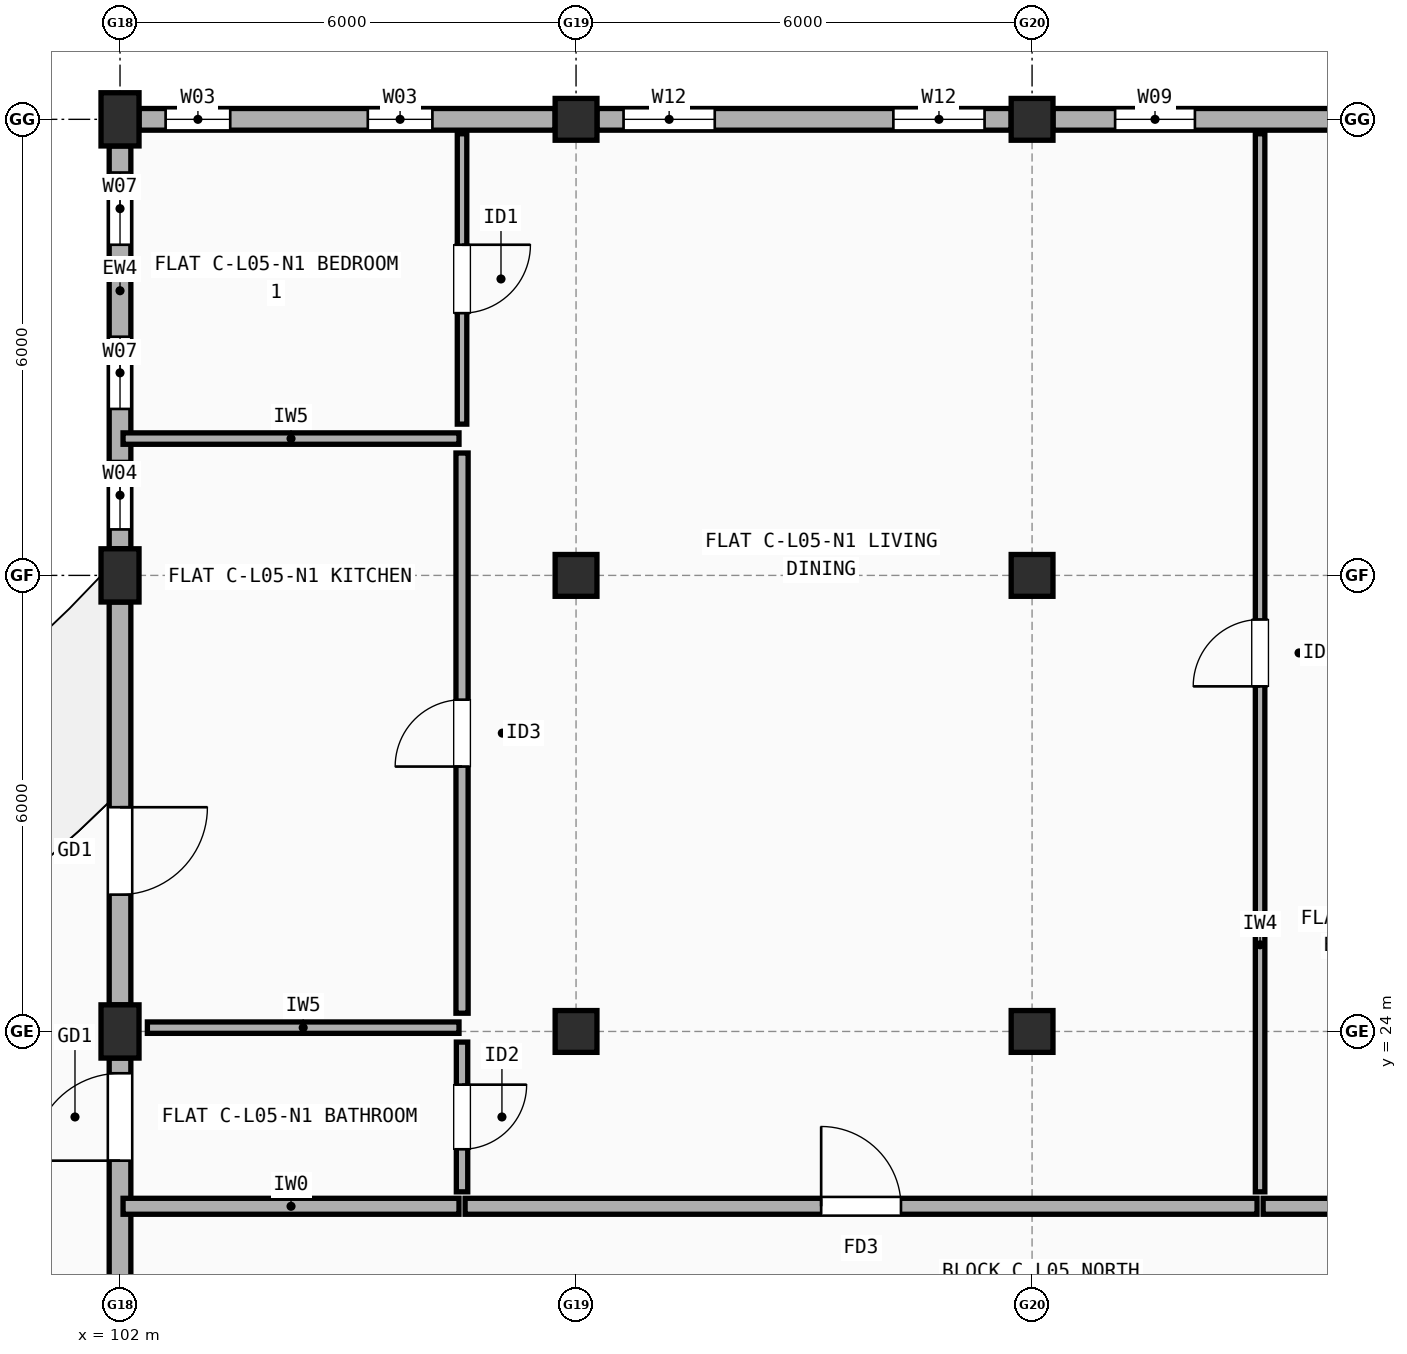
"""IFC4 building model, lengths in metres.
Left out: names, types, materials, properties, quantities, classifications, styles, units other than length and angle.
Written with IfcOpenShell. Run it as: python <this file> out.ifc"""

import sys

from ifc_helpers import new_model, si_unit, direction, frame, frame_2d, origin, origin_2d, place, context, subcontext, project, spatial, rectangle, extrude, element, fill, save


model = new_model("IFC4")
c1 = context("Model", 3, precision=1e-05, world=origin(), true_north=direction((0.0, 1.0)))
c2 = subcontext(c1, "Body", "Model", "MODEL_VIEW")
j1 = project(units=[si_unit("LENGTHUNIT", "METRE"), si_unit("PLANEANGLEUNIT", "RADIAN")], contexts=[c1])
p1 = place(None, origin())
s1 = spatial("IfcSite", under=j1, at=p1, CompositionType="ELEMENT")
p2 = place(p1, origin())
s2 = spatial("IfcBuilding", under=s1, at=p2, CompositionType="ELEMENT")
p3 = place(p2, frame((0.0, 0.0, 17.3)))
s3 = spatial("IfcBuildingStorey", under=s2, at=p3, CompositionType="ELEMENT", Elevation=17.3)
for number, where, z_axis, x_axis in (
    (1, (102.0, 24.0, 0.0), (0.0, 0.0, 1.0), (1.0, 0.0, 0.0)),
    (2, (102.0, 30.0, 0.0), (0.0, 0.0, 1.0), (1.0, 0.0, 0.0)),
    (3, (102.0, 36.0, 0.0), (0.0, 0.0, 1.0), (1.0, 0.0, 0.0)),
):
    element("IfcColumn", number, at=place(p3, frame(where, z_axis=z_axis, x_axis=x_axis)), inside=s3, PredefinedType="COLUMN", context=c2, shape_type="SweptSolid", body=[
        extrude(rectangle(XDim=0.5, YDim=0.7, at=origin_2d()), origin(), (0.0, 0.0, 1.0), 2.965),
    ])
for number, where, z_axis, x_axis in (
    (4, (108.0, 24.0, 0.0), (0.0, 0.0, 1.0), (1.0, 0.0, 0.0)),
    (5, (108.0, 30.0, 0.0), (0.0, 0.0, 1.0), (1.0, 0.0, 0.0)),
    (6, (108.0, 36.0, 0.0), (0.0, 0.0, 1.0), (1.0, 0.0, 0.0)),
    (7, (114.0, 24.0, 0.0), (0.0, 0.0, 1.0), (1.0, 0.0, 0.0)),
    (8, (114.0, 30.0, 0.0), (0.0, 0.0, 1.0), (1.0, 0.0, 0.0)),
    (9, (114.0, 36.0, 0.0), (0.0, 0.0, 1.0), (1.0, 0.0, 0.0)),
):
    element("IfcColumn", number, at=place(p3, frame(where, z_axis=z_axis, x_axis=x_axis)), inside=s3, PredefinedType="COLUMN", context=c2, shape_type="SweptSolid", body=[
        extrude(rectangle(XDim=0.55, YDim=0.55, at=origin_2d()), origin(), (0.0, 0.0, 1.0), 2.965),
    ])
p4 = place(p3, frame((119.725, 36.0, 0.0), z_axis=(0.0, 0.0, 1.0), x_axis=(-1.0, 0.0, 0.0)))
e10 = element("IfcWall", 10, at=p4, inside=s3, PredefinedType="STANDARD", context=c2, shape_type="SweptSolid", body=[
    extrude(rectangle(XDim=5.45, YDim=0.285, at=frame_2d((2.725, 0.0))), origin(), (0.0, 0.0, 1.0), 2.447),
])
p5 = place(p4, frame((0.867, 0.0, 0.9)))
e11 = element("IfcOpeningElement", 11, at=p5, cuts=e10, PredefinedType="OPENING", context=c2, shape_type="SweptSolid", body=[
    extrude(rectangle(XDim=0.95, YDim=1.35, at=frame_2d((0.475, 0.675))), frame((0.0, 0.152, 0.0), z_axis=(0.0, -1.0, 0.0), x_axis=(1.0, 0.0, 0.0)), (0.0, 0.0, 1.0), 0.305),
])
p6 = place(p4, frame((3.583, 0.0, 0.9)))
e12 = element("IfcOpeningElement", 12, at=p6, cuts=e10, PredefinedType="OPENING", context=c2, shape_type="SweptSolid", body=[
    extrude(rectangle(XDim=1.05, YDim=1.35, at=frame_2d((0.525, 0.675))), frame((0.0, 0.152, 0.0), z_axis=(0.0, -1.0, 0.0), x_axis=(1.0, 0.0, 0.0)), (0.0, 0.0, 1.0), 0.305),
])
p7 = place(p3, frame((113.725, 36.0, 0.0), z_axis=(0.0, 0.0, 1.0), x_axis=(-1.0, 0.0, 0.0)))
e13 = element("IfcWall", 13, at=p7, inside=s3, PredefinedType="STANDARD", context=c2, shape_type="SweptSolid", body=[
    extrude(rectangle(XDim=5.45, YDim=0.285, at=frame_2d((2.725, 0.0))), origin(), (0.0, 0.0, 1.0), 2.447),
])
p8 = place(p7, frame((0.35, 0.0, 0.9)))
e14 = element("IfcOpeningElement", 14, at=p8, cuts=e13, PredefinedType="OPENING", context=c2, shape_type="SweptSolid", body=[
    extrude(rectangle(XDim=1.2, YDim=1.35, at=frame_2d((0.6, 0.675))), frame((0.0, 0.152, 0.0), z_axis=(0.0, -1.0, 0.0), x_axis=(1.0, 0.0, 0.0)), (0.0, 0.0, 1.0), 0.305),
])
p9 = place(p7, frame((3.9, 0.0, 0.9)))
e15 = element("IfcOpeningElement", 15, at=p9, cuts=e13, PredefinedType="OPENING", context=c2, shape_type="SweptSolid", body=[
    extrude(rectangle(XDim=1.2, YDim=1.35, at=frame_2d((0.6, 0.675))), frame((0.0, 0.152, 0.0), z_axis=(0.0, -1.0, 0.0), x_axis=(1.0, 0.0, 0.0)), (0.0, 0.0, 1.0), 0.305),
])
p10 = place(p3, frame((107.725, 36.0, 0.0), z_axis=(0.0, 0.0, 1.0), x_axis=(-1.0, 0.0, 0.0)))
e16 = element("IfcWall", 16, at=p10, inside=s3, PredefinedType="STANDARD", context=c2, shape_type="SweptSolid", body=[
    extrude(rectangle(XDim=5.475, YDim=0.285, at=frame_2d((2.738, 0.0))), origin(), (0.0, 0.0, 1.0), 2.447),
])
p11 = place(p10, frame((1.615, 0.0, 0.9)))
e17 = element("IfcOpeningElement", 17, at=p11, cuts=e16, PredefinedType="OPENING", context=c2, shape_type="SweptSolid", body=[
    extrude(rectangle(XDim=0.85, YDim=1.25, at=frame_2d((0.425, 0.625))), frame((0.0, 0.152, 0.0), z_axis=(0.0, -1.0, 0.0), x_axis=(1.0, 0.0, 0.0)), (0.0, 0.0, 1.0), 0.305),
])
p12 = place(p10, frame((4.275, 0.0, 0.9)))
e18 = element("IfcOpeningElement", 18, at=p12, cuts=e16, PredefinedType="OPENING", context=c2, shape_type="SweptSolid", body=[
    extrude(rectangle(XDim=0.85, YDim=1.25, at=frame_2d((0.425, 0.625))), frame((0.0, 0.152, 0.0), z_axis=(0.0, -1.0, 0.0), x_axis=(1.0, 0.0, 0.0)), (0.0, 0.0, 1.0), 0.305),
])
p13 = place(p3, frame((102.0, 35.65, 0.0), z_axis=(0.0, 0.0, 1.0), x_axis=(0.0, -1.0, 0.0)))
e19 = element("IfcWall", 19, at=p13, inside=s3, PredefinedType="STANDARD", context=c2, shape_type="SweptSolid", body=[
    extrude(rectangle(XDim=5.3, YDim=0.285, at=frame_2d((2.65, 0.0))), origin(), (0.0, 0.0, 1.0), 2.447),
])
p14 = place(p13, frame((0.35, 0.0, 0.9)))
e20 = element("IfcOpeningElement", 20, at=p14, cuts=e19, PredefinedType="OPENING", context=c2, shape_type="SweptSolid", body=[
    extrude(rectangle(XDim=0.95, YDim=1.35, at=frame_2d((0.475, 0.675))), frame((0.0, 0.152, 0.0), z_axis=(0.0, -1.0, 0.0), x_axis=(1.0, 0.0, 0.0)), (0.0, 0.0, 1.0), 0.305),
])
p15 = place(p13, frame((2.51, 0.0, 0.9)))
e21 = element("IfcOpeningElement", 21, at=p15, cuts=e19, PredefinedType="OPENING", context=c2, shape_type="SweptSolid", body=[
    extrude(rectangle(XDim=0.95, YDim=1.35, at=frame_2d((0.475, 0.675))), frame((0.0, 0.152, 0.0), z_axis=(0.0, -1.0, 0.0), x_axis=(1.0, 0.0, 0.0)), (0.0, 0.0, 1.0), 0.305),
])
p16 = place(p13, frame((4.145, 0.0, 0.9)))
e22 = element("IfcOpeningElement", 22, at=p16, cuts=e19, PredefinedType="OPENING", context=c2, shape_type="SweptSolid", body=[
    extrude(rectangle(XDim=0.9, YDim=1.3, at=frame_2d((0.45, 0.65))), frame((0.0, 0.152, 0.0), z_axis=(0.0, -1.0, 0.0), x_axis=(1.0, 0.0, 0.0)), (0.0, 0.0, 1.0), 0.305),
])
p17 = place(p3, frame((102.0, 29.65, 0.0), z_axis=(0.0, 0.0, 1.0), x_axis=(0.0, -1.0, 0.0)))
e23 = element("IfcWall", 23, at=p17, inside=s3, PredefinedType="STANDARD", context=c2, shape_type="SweptSolid", body=[
    extrude(rectangle(XDim=5.3, YDim=0.285, at=frame_2d((2.65, 0.0))), origin(), (0.0, 0.0, 1.0), 2.447),
])
p18 = place(p17, frame((2.7, 0.0, 0.0)))
e24 = element("IfcOpeningElement", 24, at=p18, cuts=e23, PredefinedType="OPENING", context=c2, shape_type="SweptSolid", body=[
    extrude(rectangle(XDim=1.15, YDim=2.15, at=frame_2d((0.575, 1.075))), frame((0.0, 0.152, 0.0), z_axis=(0.0, -1.0, 0.0), x_axis=(1.0, 0.0, 0.0)), (0.0, 0.0, 1.0), 0.305),
])
p19 = place(p3, frame((102.0, 23.65, 0.0), z_axis=(0.0, 0.0, 1.0), x_axis=(0.0, -1.0, 0.0)))
e25 = element("IfcWall", 25, at=p19, inside=s3, PredefinedType="STANDARD", context=c2, shape_type="SweptSolid", body=[
    extrude(rectangle(XDim=5.3, YDim=0.285, at=frame_2d((2.65, 0.0))), origin(), (0.0, 0.0, 1.0), 2.447),
])
p20 = place(p19, frame((0.2, 0.0, 0.0)))
e26 = element("IfcOpeningElement", 26, at=p20, cuts=e25, PredefinedType="OPENING", context=c2, shape_type="SweptSolid", body=[
    extrude(rectangle(XDim=1.15, YDim=2.15, at=frame_2d((0.575, 1.075))), frame((0.0, 0.152, 0.0), z_axis=(0.0, -1.0, 0.0), x_axis=(1.0, 0.0, 0.0)), (0.0, 0.0, 1.0), 0.305),
])
p21 = place(p19, frame((3.245, 0.0, 0.9)))
e27 = element("IfcOpeningElement", 27, at=p21, cuts=e25, PredefinedType="OPENING", context=c2, shape_type="SweptSolid", body=[
    extrude(rectangle(XDim=0.8, YDim=1.2, at=frame_2d((0.4, 0.6))), frame((0.0, 0.152, 0.0), z_axis=(0.0, -1.0, 0.0), x_axis=(1.0, 0.0, 0.0)), (0.0, 0.0, 1.0), 0.305),
])
p22 = place(p3, frame((102.04, 21.7, 0.0), z_axis=(0.0, 0.0, 1.0), x_axis=(1.0, 0.0, 0.0)))
e28 = element("IfcWall", 28, at=p22, inside=s3, PredefinedType="SOLIDWALL", context=c2, shape_type="SweptSolid", body=[
    extrude(rectangle(XDim=4.42, YDim=0.21, at=frame_2d((2.21, 0.0))), origin(), (0.0, 0.0, 1.0), 2.447),
])
p23 = place(p3, frame((106.54, 21.7, 0.0), z_axis=(0.0, 0.0, 1.0), x_axis=(1.0, 0.0, 0.0)))
e29 = element("IfcWall", 29, at=p23, inside=s3, PredefinedType="SOLIDWALL", context=c2, shape_type="SweptSolid", body=[
    extrude(rectangle(XDim=10.42, YDim=0.21, at=frame_2d((5.21, 0.0))), origin(), (0.0, 0.0, 1.0), 2.508),
])
p24 = place(p23, frame((4.685, 0.0, 0.0)))
e30 = element("IfcOpeningElement", 30, at=p24, cuts=e29, PredefinedType="OPENING", context=c2, shape_type="SweptSolid", body=[
    extrude(rectangle(XDim=1.05, YDim=2.15, at=frame_2d((0.525, 1.075))), frame((0.0, 0.115, 0.0), z_axis=(0.0, -1.0, 0.0), x_axis=(1.0, 0.0, 0.0)), (0.0, 0.0, 1.0), 0.23),
])
p25 = place(p3, frame((106.5, 31.99, 0.0), z_axis=(0.0, 0.0, 1.0), x_axis=(0.0, 1.0, 0.0)))
e31 = element("IfcWall", 31, at=p25, inside=s3, PredefinedType="PARTITIONING", context=c2, shape_type="SweptSolid", body=[
    extrude(rectangle(XDim=3.82, YDim=0.125, at=frame_2d((1.91, 0.0))), origin(), (0.0, 0.0, 1.0), 2.965),
])
p26 = place(p25, frame((1.46, 0.0, 0.0)))
e32 = element("IfcOpeningElement", 32, at=p26, cuts=e31, PredefinedType="OPENING", context=c2, shape_type="SweptSolid", body=[
    extrude(rectangle(XDim=0.9, YDim=2.1, at=frame_2d((0.45, 1.05))), frame((0.0, 0.073, 0.0), z_axis=(0.0, -1.0, 0.0), x_axis=(1.0, 0.0, 0.0)), (0.0, 0.0, 1.0), 0.145),
])
p27 = place(p3, frame((106.5, 24.24, 0.0), z_axis=(0.0, 0.0, 1.0), x_axis=(0.0, 1.0, 0.0)))
e33 = element("IfcWall", 33, at=p27, inside=s3, PredefinedType="PLUMBINGWALL", context=c2, shape_type="SweptSolid", body=[
    extrude(rectangle(XDim=7.37, YDim=0.16, at=frame_2d((3.685, 0.0))), origin(), (0.0, 0.0, 1.0), 2.447),
])
p28 = place(p27, frame((3.245, 0.0, 0.0)))
e34 = element("IfcOpeningElement", 34, at=p28, cuts=e33, PredefinedType="OPENING", context=c2, shape_type="SweptSolid", body=[
    extrude(rectangle(XDim=0.88, YDim=2.1, at=frame_2d((0.44, 1.05))), frame((0.0, 0.09, 0.0), z_axis=(0.0, -1.0, 0.0), x_axis=(1.0, 0.0, 0.0)), (0.0, 0.0, 1.0), 0.18),
])
p29 = place(p3, frame((106.5, 21.89, 0.0), z_axis=(0.0, 0.0, 1.0), x_axis=(0.0, 1.0, 0.0)))
e35 = element("IfcWall", 35, at=p29, inside=s3, PredefinedType="PARTITIONING", context=c2, shape_type="SweptSolid", body=[
    extrude(rectangle(XDim=1.97, YDim=0.15, at=frame_2d((0.985, 0.0))), origin(), (0.0, 0.0, 1.0), 2.965),
])
p30 = place(p29, frame((0.56, 0.0, 0.0)))
e36 = element("IfcOpeningElement", 36, at=p30, cuts=e35, PredefinedType="OPENING", context=c2, shape_type="SweptSolid", body=[
    extrude(rectangle(XDim=0.85, YDim=2.1, at=frame_2d((0.425, 1.05))), frame((0.0, 0.085, 0.0), z_axis=(0.0, -1.0, 0.0), x_axis=(1.0, 0.0, 0.0)), (0.0, 0.0, 1.0), 0.17),
])
p31 = place(p3, frame((102.04, 31.8, 0.0), z_axis=(0.0, 0.0, 1.0), x_axis=(1.0, 0.0, 0.0)))
e37 = element("IfcWall", 37, at=p31, inside=s3, PredefinedType="PARTITIONING", context=c2, shape_type="SweptSolid", body=[
    extrude(rectangle(XDim=4.42, YDim=0.15, at=frame_2d((2.21, 0.0))), origin(), (0.0, 0.0, 1.0), 2.447),
])
p32 = place(p3, frame((102.36, 24.05, 0.0), z_axis=(0.0, 0.0, 1.0), x_axis=(1.0, 0.0, 0.0)))
e38 = element("IfcWall", 38, at=p32, inside=s3, PredefinedType="PARTITIONING", context=c2, shape_type="SweptSolid", body=[
    extrude(rectangle(XDim=4.1, YDim=0.15, at=frame_2d((2.05, 0.0))), origin(), (0.0, 0.0, 1.0), 2.508),
])
p33 = place(p3, frame((117.04, 21.7, 0.0), z_axis=(0.0, 0.0, 1.0), x_axis=(1.0, 0.0, 0.0)))
e39 = element("IfcWall", 39, at=p33, inside=s3, PredefinedType="SOLIDWALL", context=c2, shape_type="SweptSolid", body=[
    extrude(rectangle(XDim=2.92, YDim=0.21, at=frame_2d((1.46, 0.0))), origin(), (0.0, 0.0, 1.0), 2.965),
])
p34 = place(p3, frame((117.0, 21.89, 0.0), z_axis=(0.0, 0.0, 1.0), x_axis=(0.0, 1.0, 0.0)))
e40 = element("IfcWall", 40, at=p34, inside=s3, PredefinedType="PARTITIONING", context=c2, shape_type="SweptSolid", body=[
    extrude(rectangle(XDim=13.92, YDim=0.125, at=frame_2d((6.96, 0.0))), origin(), (0.0, 0.0, 1.0), 2.447),
])
p35 = place(p34, frame((6.65, 0.0, 0.0)))
e41 = element("IfcOpeningElement", 41, at=p35, cuts=e40, PredefinedType="OPENING", context=c2, shape_type="SweptSolid", body=[
    extrude(rectangle(XDim=0.88, YDim=2.1, at=frame_2d((0.44, 1.05))), frame((0.0, 0.073, 0.0), z_axis=(0.0, -1.0, 0.0), x_axis=(1.0, 0.0, 0.0)), (0.0, 0.0, 1.0), 0.145),
])
p36 = place(p6, origin())
e42 = element("IfcWindow", 42, at=p36, inside=s3, PartitioningType="SINGLE_PANEL", PredefinedType="WINDOW", context=c2, shape_type="SweptSolid", body=[
    extrude(rectangle(XDim=1.05, YDim=1.35, at=frame_2d((0.525, 0.675))), frame((0.0, 0.03, 0.0), z_axis=(0.0, -1.0, 0.0), x_axis=(1.0, 0.0, 0.0)), (0.0, 0.0, 1.0), 0.06),
])
fill(e12, e42)
p37 = place(p8, origin())
e43 = element("IfcWindow", 43, at=p37, inside=s3, PartitioningType="SINGLE_PANEL", PredefinedType="WINDOW", context=c2, shape_type="SweptSolid", body=[
    extrude(rectangle(XDim=1.2, YDim=1.35, at=frame_2d((0.6, 0.675))), frame((0.0, 0.03, 0.0), z_axis=(0.0, -1.0, 0.0), x_axis=(1.0, 0.0, 0.0)), (0.0, 0.0, 1.0), 0.06),
])
fill(e14, e43)
p38 = place(p9, origin())
e44 = element("IfcWindow", 44, at=p38, inside=s3, PartitioningType="SINGLE_PANEL", PredefinedType="WINDOW", context=c2, shape_type="SweptSolid", body=[
    extrude(rectangle(XDim=1.2, YDim=1.35, at=frame_2d((0.6, 0.675))), frame((0.0, 0.03, 0.0), z_axis=(0.0, -1.0, 0.0), x_axis=(1.0, 0.0, 0.0)), (0.0, 0.0, 1.0), 0.06),
])
fill(e15, e44)
p39 = place(p11, origin())
e45 = element("IfcWindow", 45, at=p39, inside=s3, PartitioningType="SINGLE_PANEL", PredefinedType="WINDOW", context=c2, shape_type="SweptSolid", body=[
    extrude(rectangle(XDim=0.85, YDim=1.25, at=frame_2d((0.425, 0.625))), frame((0.0, 0.03, 0.0), z_axis=(0.0, -1.0, 0.0), x_axis=(1.0, 0.0, 0.0)), (0.0, 0.0, 1.0), 0.06),
])
fill(e17, e45)
p40 = place(p12, origin())
e46 = element("IfcWindow", 46, at=p40, inside=s3, PartitioningType="SINGLE_PANEL", PredefinedType="WINDOW", context=c2, shape_type="SweptSolid", body=[
    extrude(rectangle(XDim=0.85, YDim=1.25, at=frame_2d((0.425, 0.625))), frame((0.0, 0.03, 0.0), z_axis=(0.0, -1.0, 0.0), x_axis=(1.0, 0.0, 0.0)), (0.0, 0.0, 1.0), 0.06),
])
fill(e18, e46)
p41 = place(p14, origin())
e47 = element("IfcWindow", 47, at=p41, inside=s3, PartitioningType="SINGLE_PANEL", PredefinedType="WINDOW", context=c2, shape_type="SweptSolid", body=[
    extrude(rectangle(XDim=0.95, YDim=1.35, at=frame_2d((0.475, 0.675))), frame((0.0, 0.03, 0.0), z_axis=(0.0, -1.0, 0.0), x_axis=(1.0, 0.0, 0.0)), (0.0, 0.0, 1.0), 0.06),
])
fill(e20, e47)
p42 = place(p15, origin())
e48 = element("IfcWindow", 48, at=p42, inside=s3, PartitioningType="SINGLE_PANEL", PredefinedType="WINDOW", context=c2, shape_type="SweptSolid", body=[
    extrude(rectangle(XDim=0.95, YDim=1.35, at=frame_2d((0.475, 0.675))), frame((0.0, 0.03, 0.0), z_axis=(0.0, -1.0, 0.0), x_axis=(1.0, 0.0, 0.0)), (0.0, 0.0, 1.0), 0.06),
])
fill(e21, e48)
p43 = place(p16, origin())
e49 = element("IfcWindow", 49, at=p43, inside=s3, PartitioningType="SINGLE_PANEL", PredefinedType="WINDOW", context=c2, shape_type="SweptSolid", body=[
    extrude(rectangle(XDim=0.9, YDim=1.3, at=frame_2d((0.45, 0.65))), frame((0.0, 0.03, 0.0), z_axis=(0.0, -1.0, 0.0), x_axis=(1.0, 0.0, 0.0)), (0.0, 0.0, 1.0), 0.06),
])
fill(e22, e49)
p44 = place(p18, frame((1.15, 0.0, 0.0), z_axis=(0.0, 0.0, 1.0), x_axis=(-1.0, 0.0, 0.0)))
e50 = element("IfcDoor", 50, at=p44, inside=s3, OperationType="SINGLE_SWING_LEFT", PredefinedType="DOOR", context=c2, shape_type="SweptSolid", body=[
    extrude(rectangle(XDim=1.15, YDim=2.15, at=frame_2d((0.575, 1.075))), frame((0.0, 0.025, 0.0), z_axis=(0.0, -1.0, 0.0), x_axis=(1.0, 0.0, 0.0)), (0.0, 0.0, 1.0), 0.05),
])
fill(e24, e50)
p45 = place(p20, frame((1.15, 0.0, 0.0), z_axis=(0.0, 0.0, 1.0), x_axis=(-1.0, 0.0, 0.0)))
e51 = element("IfcDoor", 51, at=p45, inside=s3, OperationType="SINGLE_SWING_RIGHT", PredefinedType="DOOR", context=c2, shape_type="SweptSolid", body=[
    extrude(rectangle(XDim=1.15, YDim=2.15, at=frame_2d((0.575, 1.075))), frame((0.0, 0.025, 0.0), z_axis=(0.0, -1.0, 0.0), x_axis=(1.0, 0.0, 0.0)), (0.0, 0.0, 1.0), 0.05),
])
fill(e26, e51)
p46 = place(p24, origin())
e52 = element("IfcDoor", 52, at=p46, inside=s3, OperationType="SINGLE_SWING_LEFT", PredefinedType="DOOR", context=c2, shape_type="SweptSolid", body=[
    extrude(rectangle(XDim=1.05, YDim=2.15, at=frame_2d((0.525, 1.075))), frame((0.0, 0.025, 0.0), z_axis=(0.0, -1.0, 0.0), x_axis=(1.0, 0.0, 0.0)), (0.0, 0.0, 1.0), 0.05),
])
fill(e30, e52)
p47 = place(p26, origin())
e53 = element("IfcDoor", 53, at=p47, inside=s3, OperationType="SINGLE_SWING_RIGHT", PredefinedType="DOOR", context=c2, shape_type="SweptSolid", body=[
    extrude(rectangle(XDim=0.9, YDim=2.1, at=frame_2d((0.45, 1.05))), frame((0.0, 0.025, 0.0), z_axis=(0.0, -1.0, 0.0), x_axis=(1.0, 0.0, 0.0)), (0.0, 0.0, 1.0), 0.05),
])
fill(e32, e53)
p48 = place(p28, origin())
e54 = element("IfcDoor", 54, at=p48, inside=s3, OperationType="SINGLE_SWING_LEFT", PredefinedType="DOOR", context=c2, shape_type="SweptSolid", body=[
    extrude(rectangle(XDim=0.88, YDim=2.1, at=frame_2d((0.44, 1.05))), frame((0.0, 0.025, 0.0), z_axis=(0.0, -1.0, 0.0), x_axis=(1.0, 0.0, 0.0)), (0.0, 0.0, 1.0), 0.05),
])
fill(e34, e54)
p49 = place(p30, origin())
e55 = element("IfcDoor", 55, at=p49, inside=s3, OperationType="SINGLE_SWING_RIGHT", PredefinedType="DOOR", context=c2, shape_type="SweptSolid", body=[
    extrude(rectangle(XDim=0.85, YDim=2.1, at=frame_2d((0.425, 1.05))), frame((0.0, 0.025, 0.0), z_axis=(0.0, -1.0, 0.0), x_axis=(1.0, 0.0, 0.0)), (0.0, 0.0, 1.0), 0.05),
])
fill(e36, e55)
p50 = place(p35, origin())
e56 = element("IfcDoor", 56, at=p50, inside=s3, OperationType="SINGLE_SWING_LEFT", PredefinedType="DOOR", context=c2, shape_type="SweptSolid", body=[
    extrude(rectangle(XDim=0.88, YDim=2.1, at=frame_2d((0.44, 1.05))), frame((0.0, 0.025, 0.0), z_axis=(0.0, -1.0, 0.0), x_axis=(1.0, 0.0, 0.0)), (0.0, 0.0, 1.0), 0.05),
])
fill(e41, e56)
save(model, sys.argv[1])
